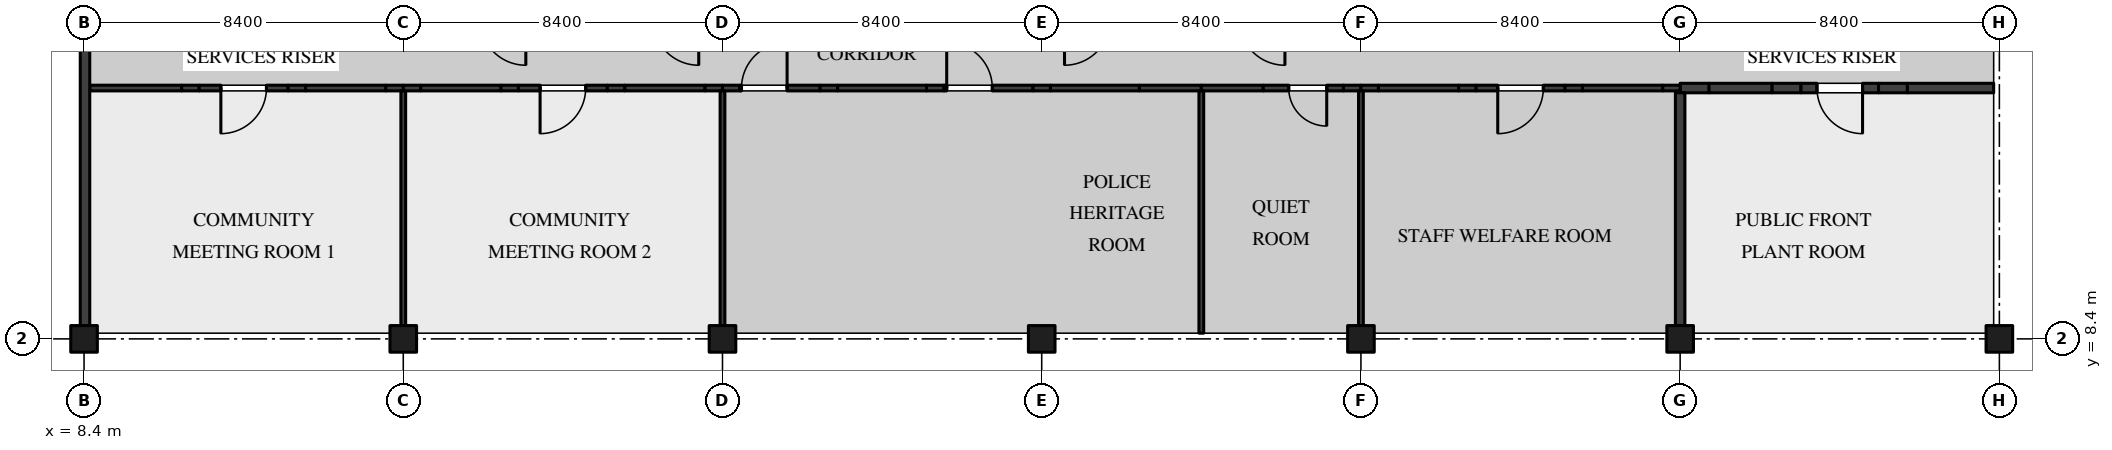
"""IFC4 building model, lengths in metres.
Left out: names, types, materials, properties, quantities, classifications, styles, units other than length and angle.
Written with IfcOpenShell. Run it as: python <this file> out.ifc"""

import sys

from ifc_helpers import new_model, si_unit, direction, frame, frame_2d, origin, origin_2d, place, context, subcontext, project, spatial, rectangle, extrude, element, fill, save


model = new_model("IFC4")
c1 = context("Model", 3, precision=1e-05, world=origin(), true_north=direction((0.0, 1.0)))
c2 = subcontext(c1, "Body", "Model", "MODEL_VIEW")
j1 = project(units=[si_unit("LENGTHUNIT", "METRE"), si_unit("PLANEANGLEUNIT", "RADIAN")], contexts=[c1])
p1 = place(None, origin())
s1 = spatial("IfcSite", under=j1, at=p1, CompositionType="ELEMENT")
p2 = place(p1, origin())
s2 = spatial("IfcBuilding", under=s1, at=p2, CompositionType="ELEMENT")
p3 = place(p2, frame((0.0, 0.0, 5.4)))
s3 = spatial("IfcBuildingStorey", under=s2, at=p3, CompositionType="ELEMENT", Elevation=5.4)
for number, where, z_axis, x_axis in (
    (1, (8.4, 8.4, 0.0), (0.0, 0.0, 1.0), (1.0, 0.0, 0.0)),
    (2, (16.8, 8.4, 0.0), (0.0, 0.0, 1.0), (1.0, 0.0, 0.0)),
    (3, (25.2, 8.4, 0.0), (0.0, 0.0, 1.0), (1.0, 0.0, 0.0)),
    (4, (33.6, 8.4, 0.0), (0.0, 0.0, 1.0), (1.0, 0.0, 0.0)),
    (5, (42.0, 8.4, 0.0), (0.0, 0.0, 1.0), (1.0, 0.0, 0.0)),
    (6, (50.4, 8.4, 0.0), (0.0, 0.0, 1.0), (1.0, 0.0, 0.0)),
    (7, (58.8, 8.4, 0.0), (0.0, 0.0, 1.0), (1.0, 0.0, 0.0)),
):
    element("IfcColumn", number, at=place(p3, frame(where, z_axis=z_axis, x_axis=x_axis)), inside=s3, PredefinedType="COLUMN", context=c2, shape_type="SweptSolid", body=[
        extrude(rectangle(XDim=0.7, YDim=0.7, at=origin_2d()), origin(), (0.0, 0.0, 1.0), 4.37),
    ])
p4 = place(p3, frame((8.55, 15.0, 0.0), z_axis=(0.0, 0.0, 1.0), x_axis=(1.0, 0.0, 0.0)))
e8 = element("IfcWall", 8, at=p4, inside=s3, PredefinedType="PARTITIONING", context=c2, shape_type="SweptSolid", body=[
    extrude(rectangle(XDim=2.42, YDim=0.15, at=frame_2d((1.21, 0.0))), origin(), (0.0, 0.0, 1.0), 4.37),
])
p5 = place(p3, frame((10.97, 15.0, 0.0), z_axis=(0.0, 0.0, 1.0), x_axis=(1.0, 0.0, 0.0)))
e9 = element("IfcWall", 9, at=p5, inside=s3, PredefinedType="PARTITIONING", context=c2, shape_type="SweptSolid", body=[
    extrude(rectangle(XDim=0.46, YDim=0.15, at=frame_2d((0.23, 0.0))), origin(), (0.0, 0.0, 1.0), 3.895),
])
p6 = place(p3, frame((11.43, 15.0, 0.0), z_axis=(0.0, 0.0, 1.0), x_axis=(1.0, 0.0, 0.0)))
e10 = element("IfcWall", 10, at=p6, inside=s3, PredefinedType="PARTITIONING", context=c2, shape_type="SweptSolid", body=[
    extrude(rectangle(XDim=2.34, YDim=0.15, at=frame_2d((1.17, 0.0))), origin(), (0.0, 0.0, 1.0), 4.37),
])
p7 = place(p6, frame((0.57, 0.0, 0.0)))
e11 = element("IfcOpeningElement", 11, at=p7, cuts=e10, PredefinedType="OPENING", context=c2, shape_type="SweptSolid", body=[
    extrude(rectangle(XDim=1.2, YDim=2.4, at=frame_2d((0.6, 1.2))), frame((0.0, 0.085, 0.0), z_axis=(0.0, -1.0, 0.0), x_axis=(1.0, 0.0, 0.0)), (0.0, 0.0, 1.0), 0.17),
])
p8 = place(p3, frame((13.77, 15.0, 0.0), z_axis=(0.0, 0.0, 1.0), x_axis=(1.0, 0.0, 0.0)))
e12 = element("IfcWall", 12, at=p8, inside=s3, PredefinedType="PARTITIONING", context=c2, shape_type="SweptSolid", body=[
    extrude(rectangle(XDim=0.46, YDim=0.15, at=frame_2d((0.23, 0.0))), origin(), (0.0, 0.0, 1.0), 3.895),
])
p9 = place(p3, frame((14.23, 15.0, 0.0), z_axis=(0.0, 0.0, 1.0), x_axis=(1.0, 0.0, 0.0)))
e13 = element("IfcWall", 13, at=p9, inside=s3, PredefinedType="PARTITIONING", context=c2, shape_type="SweptSolid", body=[
    extrude(rectangle(XDim=2.11, YDim=0.15, at=frame_2d((1.055, 0.0))), origin(), (0.0, 0.0, 1.0), 4.37),
])
p10 = place(p3, frame((16.34, 15.0, 0.0), z_axis=(0.0, 0.0, 1.0), x_axis=(1.0, 0.0, 0.0)))
e14 = element("IfcWall", 14, at=p10, inside=s3, PredefinedType="PARTITIONING", context=c2, shape_type="SweptSolid", body=[
    extrude(rectangle(XDim=0.46, YDim=0.15, at=frame_2d((0.23, 0.0))), origin(), (0.0, 0.0, 1.0), 3.746),
])
p11 = place(p3, frame((50.4, 15.0, 0.0), z_axis=(0.0, 0.0, 1.0), x_axis=(1.0, 0.0, 0.0)))
e15 = element("IfcWall", 15, at=p11, inside=s3, PredefinedType="PARTITIONING", context=c2, shape_type="SweptSolid", body=[
    extrude(rectangle(XDim=0.76, YDim=0.25, at=frame_2d((0.38, 0.0))), origin(), (0.0, 0.0, 1.0), 3.746),
])
p12 = place(p3, frame((51.16, 15.0, 0.0), z_axis=(0.0, 0.0, 1.0), x_axis=(1.0, 0.0, 0.0)))
e16 = element("IfcWall", 16, at=p12, inside=s3, PredefinedType="PARTITIONING", context=c2, shape_type="SweptSolid", body=[
    extrude(rectangle(XDim=1.66, YDim=0.25, at=frame_2d((0.83, 0.0))), origin(), (0.0, 0.0, 1.0), 4.37),
])
p13 = place(p3, frame((52.82, 15.0, 0.0), z_axis=(0.0, 0.0, 1.0), x_axis=(1.0, 0.0, 0.0)))
e17 = element("IfcWall", 17, at=p13, inside=s3, PredefinedType="PARTITIONING", context=c2, shape_type="SweptSolid", body=[
    extrude(rectangle(XDim=0.76, YDim=0.25, at=frame_2d((0.38, 0.0))), origin(), (0.0, 0.0, 1.0), 3.895),
])
p14 = place(p3, frame((53.58, 15.0, 0.0), z_axis=(0.0, 0.0, 1.0), x_axis=(1.0, 0.0, 0.0)))
e18 = element("IfcWall", 18, at=p14, inside=s3, PredefinedType="PARTITIONING", context=c2, shape_type="SweptSolid", body=[
    extrude(rectangle(XDim=2.04, YDim=0.25, at=frame_2d((1.02, 0.0))), origin(), (0.0, 0.0, 1.0), 4.37),
])
p15 = place(p14, frame((0.42, 0.0, 0.0)))
e19 = element("IfcOpeningElement", 19, at=p15, cuts=e18, PredefinedType="OPENING", context=c2, shape_type="SweptSolid", body=[
    extrude(rectangle(XDim=1.2, YDim=2.4, at=frame_2d((0.6, 1.2))), frame((0.0, 0.135, 0.0), z_axis=(0.0, -1.0, 0.0), x_axis=(1.0, 0.0, 0.0)), (0.0, 0.0, 1.0), 0.27),
])
p16 = place(p3, frame((55.62, 15.0, 0.0), z_axis=(0.0, 0.0, 1.0), x_axis=(1.0, 0.0, 0.0)))
e20 = element("IfcWall", 20, at=p16, inside=s3, PredefinedType="PARTITIONING", context=c2, shape_type="SweptSolid", body=[
    extrude(rectangle(XDim=0.76, YDim=0.25, at=frame_2d((0.38, 0.0))), origin(), (0.0, 0.0, 1.0), 3.895),
])
p17 = place(p3, frame((56.38, 15.0, 0.0), z_axis=(0.0, 0.0, 1.0), x_axis=(1.0, 0.0, 0.0)))
e21 = element("IfcWall", 21, at=p17, inside=s3, PredefinedType="PARTITIONING", context=c2, shape_type="SweptSolid", body=[
    extrude(rectangle(XDim=2.27, YDim=0.25, at=frame_2d((1.135, 0.0))), origin(), (0.0, 0.0, 1.0), 4.37),
])
p18 = place(p3, frame((16.8, 15.0, 0.0), z_axis=(0.0, 0.0, 1.0), x_axis=(1.0, 0.0, 0.0)))
e22 = element("IfcWall", 22, at=p18, inside=s3, PredefinedType="PARTITIONING", context=c2, shape_type="SweptSolid", body=[
    extrude(rectangle(XDim=0.46, YDim=0.15, at=frame_2d((0.23, 0.0))), origin(), (0.0, 0.0, 1.0), 3.746),
])
p19 = place(p3, frame((17.26, 15.0, 0.0), z_axis=(0.0, 0.0, 1.0), x_axis=(1.0, 0.0, 0.0)))
e23 = element("IfcWall", 23, at=p19, inside=s3, PredefinedType="PARTITIONING", context=c2, shape_type="SweptSolid", body=[
    extrude(rectangle(XDim=2.11, YDim=0.15, at=frame_2d((1.055, 0.0))), origin(), (0.0, 0.0, 1.0), 4.37),
])
p20 = place(p3, frame((19.37, 15.0, 0.0), z_axis=(0.0, 0.0, 1.0), x_axis=(1.0, 0.0, 0.0)))
e24 = element("IfcWall", 24, at=p20, inside=s3, PredefinedType="PARTITIONING", context=c2, shape_type="SweptSolid", body=[
    extrude(rectangle(XDim=0.46, YDim=0.15, at=frame_2d((0.23, 0.0))), origin(), (0.0, 0.0, 1.0), 3.895),
])
p21 = place(p3, frame((19.83, 15.0, 0.0), z_axis=(0.0, 0.0, 1.0), x_axis=(1.0, 0.0, 0.0)))
e25 = element("IfcWall", 25, at=p21, inside=s3, PredefinedType="PARTITIONING", context=c2, shape_type="SweptSolid", body=[
    extrude(rectangle(XDim=2.34, YDim=0.15, at=frame_2d((1.17, 0.0))), origin(), (0.0, 0.0, 1.0), 4.37),
])
p22 = place(p21, frame((0.57, 0.0, 0.0)))
e26 = element("IfcOpeningElement", 26, at=p22, cuts=e25, PredefinedType="OPENING", context=c2, shape_type="SweptSolid", body=[
    extrude(rectangle(XDim=1.2, YDim=2.4, at=frame_2d((0.6, 1.2))), frame((0.0, 0.085, 0.0), z_axis=(0.0, -1.0, 0.0), x_axis=(1.0, 0.0, 0.0)), (0.0, 0.0, 1.0), 0.17),
])
p23 = place(p3, frame((22.17, 15.0, 0.0), z_axis=(0.0, 0.0, 1.0), x_axis=(1.0, 0.0, 0.0)))
e27 = element("IfcWall", 27, at=p23, inside=s3, PredefinedType="PARTITIONING", context=c2, shape_type="SweptSolid", body=[
    extrude(rectangle(XDim=0.46, YDim=0.15, at=frame_2d((0.23, 0.0))), origin(), (0.0, 0.0, 1.0), 3.895),
])
p24 = place(p3, frame((22.63, 15.0, 0.0), z_axis=(0.0, 0.0, 1.0), x_axis=(1.0, 0.0, 0.0)))
e28 = element("IfcWall", 28, at=p24, inside=s3, PredefinedType="PARTITIONING", context=c2, shape_type="SweptSolid", body=[
    extrude(rectangle(XDim=2.11, YDim=0.15, at=frame_2d((1.055, 0.0))), origin(), (0.0, 0.0, 1.0), 4.37),
])
for number, where, z_axis, x_axis in (
    (29, (24.74, 15.0, 0.0), (0.0, 0.0, 1.0), (1.0, 0.0, 0.0)),
    (30, (25.2, 15.0, 0.0), (0.0, 0.0, 1.0), (1.0, 0.0, 0.0)),
):
    element("IfcWall", number, at=place(p3, frame(where, z_axis=z_axis, x_axis=x_axis)), inside=s3, PredefinedType="PARTITIONING", context=c2, shape_type="SweptSolid", body=[
        extrude(rectangle(XDim=0.46, YDim=0.15, at=frame_2d((0.23, 0.0))), origin(), (0.0, 0.0, 1.0), 3.746),
    ])
p25 = place(p3, frame((25.66, 15.0, 0.0), z_axis=(0.0, 0.0, 1.0), x_axis=(1.0, 0.0, 0.0)))
e31 = element("IfcWall", 31, at=p25, inside=s3, PredefinedType="PARTITIONING", context=c2, shape_type="SweptSolid", body=[
    extrude(rectangle(XDim=2.11, YDim=0.15, at=frame_2d((1.055, 0.0))), origin(), (0.0, 0.0, 1.0), 4.37),
])
p26 = place(p25, frame((0.04, 0.0, 0.0)))
e32 = element("IfcOpeningElement", 32, at=p26, cuts=e31, PredefinedType="OPENING", context=c2, shape_type="SweptSolid", body=[
    extrude(rectangle(XDim=1.2, YDim=2.4, at=frame_2d((0.6, 1.2))), frame((0.0, 0.085, 0.0), z_axis=(0.0, -1.0, 0.0), x_axis=(1.0, 0.0, 0.0)), (0.0, 0.0, 1.0), 0.17),
])
p27 = place(p3, frame((27.77, 15.0, 0.0), z_axis=(0.0, 0.0, 1.0), x_axis=(1.0, 0.0, 0.0)))
e33 = element("IfcWall", 33, at=p27, inside=s3, PredefinedType="PARTITIONING", context=c2, shape_type="SweptSolid", body=[
    extrude(rectangle(XDim=0.46, YDim=0.15, at=frame_2d((0.23, 0.0))), origin(), (0.0, 0.0, 1.0), 3.895),
])
p28 = place(p3, frame((28.23, 15.0, 0.0), z_axis=(0.0, 0.0, 1.0), x_axis=(1.0, 0.0, 0.0)))
e34 = element("IfcWall", 34, at=p28, inside=s3, PredefinedType="PARTITIONING", context=c2, shape_type="SweptSolid", body=[
    extrude(rectangle(XDim=2.34, YDim=0.15, at=frame_2d((1.17, 0.0))), origin(), (0.0, 0.0, 1.0), 4.37),
])
p29 = place(p3, frame((30.57, 15.0, 0.0), z_axis=(0.0, 0.0, 1.0), x_axis=(1.0, 0.0, 0.0)))
e35 = element("IfcWall", 35, at=p29, inside=s3, PredefinedType="PARTITIONING", context=c2, shape_type="SweptSolid", body=[
    extrude(rectangle(XDim=0.46, YDim=0.15, at=frame_2d((0.23, 0.0))), origin(), (0.0, 0.0, 1.0), 3.895),
])
p30 = place(p3, frame((31.03, 15.0, 0.0), z_axis=(0.0, 0.0, 1.0), x_axis=(1.0, 0.0, 0.0)))
e36 = element("IfcWall", 36, at=p30, inside=s3, PredefinedType="PARTITIONING", context=c2, shape_type="SweptSolid", body=[
    extrude(rectangle(XDim=2.34, YDim=0.15, at=frame_2d((1.17, 0.0))), origin(), (0.0, 0.0, 1.0), 4.37),
])
p31 = place(p30, frame((0.07, 0.0, 0.0)))
e37 = element("IfcOpeningElement", 37, at=p31, cuts=e36, PredefinedType="OPENING", context=c2, shape_type="SweptSolid", body=[
    extrude(rectangle(XDim=1.2, YDim=2.4, at=frame_2d((0.6, 1.2))), frame((0.0, 0.085, 0.0), z_axis=(0.0, -1.0, 0.0), x_axis=(1.0, 0.0, 0.0)), (0.0, 0.0, 1.0), 0.17),
])
p32 = place(p3, frame((33.37, 15.0, 0.0), z_axis=(0.0, 0.0, 1.0), x_axis=(1.0, 0.0, 0.0)))
e38 = element("IfcWall", 38, at=p32, inside=s3, PredefinedType="PARTITIONING", context=c2, shape_type="SweptSolid", body=[
    extrude(rectangle(XDim=0.46, YDim=0.15, at=frame_2d((0.23, 0.0))), origin(), (0.0, 0.0, 1.0), 3.746),
])
p33 = place(p3, frame((33.83, 15.0, 0.0), z_axis=(0.0, 0.0, 1.0), x_axis=(1.0, 0.0, 0.0)))
e39 = element("IfcWall", 39, at=p33, inside=s3, PredefinedType="PARTITIONING", context=c2, shape_type="SweptSolid", body=[
    extrude(rectangle(XDim=2.34, YDim=0.15, at=frame_2d((1.17, 0.0))), origin(), (0.0, 0.0, 1.0), 4.37),
])
p34 = place(p3, frame((36.17, 15.0, 0.0), z_axis=(0.0, 0.0, 1.0), x_axis=(1.0, 0.0, 0.0)))
e40 = element("IfcWall", 40, at=p34, inside=s3, PredefinedType="PARTITIONING", context=c2, shape_type="SweptSolid", body=[
    extrude(rectangle(XDim=1.63, YDim=0.15, at=frame_2d((0.815, 0.0))), origin(), (0.0, 0.0, 1.0), 3.895),
])
p35 = place(p3, frame((37.8, 15.0, 0.0), z_axis=(0.0, 0.0, 1.0), x_axis=(1.0, 0.0, 0.0)))
e41 = element("IfcWall", 41, at=p35, inside=s3, PredefinedType="PARTITIONING", context=c2, shape_type="SweptSolid", body=[
    extrude(rectangle(XDim=1.63, YDim=0.15, at=frame_2d((0.815, 0.0))), origin(), (0.0, 0.0, 1.0), 3.895),
])
p36 = place(p3, frame((39.43, 15.0, 0.0), z_axis=(0.0, 0.0, 1.0), x_axis=(1.0, 0.0, 0.0)))
e42 = element("IfcWall", 42, at=p36, inside=s3, PredefinedType="PARTITIONING", context=c2, shape_type="SweptSolid", body=[
    extrude(rectangle(XDim=2.11, YDim=0.15, at=frame_2d((1.055, 0.0))), origin(), (0.0, 0.0, 1.0), 4.37),
])
p37 = place(p36, frame((0.67, 0.0, 0.0)))
e43 = element("IfcOpeningElement", 43, at=p37, cuts=e42, PredefinedType="OPENING", context=c2, shape_type="SweptSolid", body=[
    extrude(rectangle(XDim=1.0, YDim=2.1, at=frame_2d((0.5, 1.05))), frame((0.0, 0.085, 0.0), z_axis=(0.0, -1.0, 0.0), x_axis=(1.0, 0.0, 0.0)), (0.0, 0.0, 1.0), 0.17),
])
for number, where, z_axis, x_axis in (
    (44, (41.54, 15.0, 0.0), (0.0, 0.0, 1.0), (1.0, 0.0, 0.0)),
    (45, (42.0, 15.0, 0.0), (0.0, 0.0, 1.0), (1.0, 0.0, 0.0)),
):
    element("IfcWall", number, at=place(p3, frame(where, z_axis=z_axis, x_axis=x_axis)), inside=s3, PredefinedType="PARTITIONING", context=c2, shape_type="SweptSolid", body=[
        extrude(rectangle(XDim=0.46, YDim=0.15, at=frame_2d((0.23, 0.0))), origin(), (0.0, 0.0, 1.0), 3.746),
    ])
p38 = place(p3, frame((42.46, 15.0, 0.0), z_axis=(0.0, 0.0, 1.0), x_axis=(1.0, 0.0, 0.0)))
e46 = element("IfcWall", 46, at=p38, inside=s3, PredefinedType="PARTITIONING", context=c2, shape_type="SweptSolid", body=[
    extrude(rectangle(XDim=2.11, YDim=0.15, at=frame_2d((1.055, 0.0))), origin(), (0.0, 0.0, 1.0), 4.37),
])
p39 = place(p3, frame((44.57, 15.0, 0.0), z_axis=(0.0, 0.0, 1.0), x_axis=(1.0, 0.0, 0.0)))
e47 = element("IfcWall", 47, at=p39, inside=s3, PredefinedType="PARTITIONING", context=c2, shape_type="SweptSolid", body=[
    extrude(rectangle(XDim=0.46, YDim=0.15, at=frame_2d((0.23, 0.0))), origin(), (0.0, 0.0, 1.0), 3.895),
])
p40 = place(p3, frame((45.03, 15.0, 0.0), z_axis=(0.0, 0.0, 1.0), x_axis=(1.0, 0.0, 0.0)))
e48 = element("IfcWall", 48, at=p40, inside=s3, PredefinedType="PARTITIONING", context=c2, shape_type="SweptSolid", body=[
    extrude(rectangle(XDim=2.34, YDim=0.15, at=frame_2d((1.17, 0.0))), origin(), (0.0, 0.0, 1.0), 4.37),
])
p41 = place(p40, frame((0.57, 0.0, 0.0)))
e49 = element("IfcOpeningElement", 49, at=p41, cuts=e48, PredefinedType="OPENING", context=c2, shape_type="SweptSolid", body=[
    extrude(rectangle(XDim=1.2, YDim=2.4, at=frame_2d((0.6, 1.2))), frame((0.0, 0.085, 0.0), z_axis=(0.0, -1.0, 0.0), x_axis=(1.0, 0.0, 0.0)), (0.0, 0.0, 1.0), 0.17),
])
p42 = place(p3, frame((47.37, 15.0, 0.0), z_axis=(0.0, 0.0, 1.0), x_axis=(1.0, 0.0, 0.0)))
e50 = element("IfcWall", 50, at=p42, inside=s3, PredefinedType="PARTITIONING", context=c2, shape_type="SweptSolid", body=[
    extrude(rectangle(XDim=0.46, YDim=0.15, at=frame_2d((0.23, 0.0))), origin(), (0.0, 0.0, 1.0), 3.895),
])
p43 = place(p3, frame((47.83, 15.0, 0.0), z_axis=(0.0, 0.0, 1.0), x_axis=(1.0, 0.0, 0.0)))
e51 = element("IfcWall", 51, at=p43, inside=s3, PredefinedType="PARTITIONING", context=c2, shape_type="SweptSolid", body=[
    extrude(rectangle(XDim=2.11, YDim=0.15, at=frame_2d((1.055, 0.0))), origin(), (0.0, 0.0, 1.0), 4.37),
])
p44 = place(p3, frame((49.94, 15.0, 0.0), z_axis=(0.0, 0.0, 1.0), x_axis=(1.0, 0.0, 0.0)))
e52 = element("IfcWall", 52, at=p44, inside=s3, PredefinedType="PARTITIONING", context=c2, shape_type="SweptSolid", body=[
    extrude(rectangle(XDim=0.46, YDim=0.15, at=frame_2d((0.23, 0.0))), origin(), (0.0, 0.0, 1.0), 3.746),
])
p45 = place(p3, frame((16.8, 8.75, 0.0), z_axis=(0.0, 0.0, 1.0), x_axis=(0.0, 1.0, 0.0)))
e53 = element("IfcWall", 53, at=p45, inside=s3, PredefinedType="PARTITIONING", context=c2, shape_type="SweptSolid", body=[
    extrude(rectangle(XDim=6.175, YDim=0.125, at=frame_2d((3.087, 0.0))), origin(), (0.0, 0.0, 1.0), 3.746),
])
p46 = place(p3, frame((50.4, 8.75, 0.0), z_axis=(0.0, 0.0, 1.0), x_axis=(0.0, 1.0, 0.0)))
e54 = element("IfcWall", 54, at=p46, inside=s3, PredefinedType="PARTITIONING", context=c2, shape_type="SweptSolid", body=[
    extrude(rectangle(XDim=6.125, YDim=0.25, at=frame_2d((3.062, 0.0))), origin(), (0.0, 0.0, 1.0), 3.746),
])
p47 = place(p3, frame((25.2, 8.75, 0.0), z_axis=(0.0, 0.0, 1.0), x_axis=(0.0, 1.0, 0.0)))
e55 = element("IfcWall", 55, at=p47, inside=s3, PredefinedType="PARTITIONING", context=c2, shape_type="SweptSolid", body=[
    extrude(rectangle(XDim=6.175, YDim=0.125, at=frame_2d((3.087, 0.0))), origin(), (0.0, 0.0, 1.0), 3.746),
])
p48 = place(p3, frame((37.8, 8.55, 0.0), z_axis=(0.0, 0.0, 1.0), x_axis=(0.0, 1.0, 0.0)))
e56 = element("IfcWall", 56, at=p48, inside=s3, PredefinedType="PARTITIONING", context=c2, shape_type="SweptSolid", body=[
    extrude(rectangle(XDim=6.375, YDim=0.125, at=frame_2d((3.188, 0.0))), origin(), (0.0, 0.0, 1.0), 4.37),
])
p49 = place(p3, frame((42.0, 8.75, 0.0), z_axis=(0.0, 0.0, 1.0), x_axis=(0.0, 1.0, 0.0)))
e57 = element("IfcWall", 57, at=p49, inside=s3, PredefinedType="PARTITIONING", context=c2, shape_type="SweptSolid", body=[
    extrude(rectangle(XDim=6.175, YDim=0.125, at=frame_2d((3.087, 0.0))), origin(), (0.0, 0.0, 1.0), 3.746),
])
p50 = place(p3, frame((8.425, 16.6, 0.0), z_axis=(0.0, 0.0, 1.0), x_axis=(0.0, -1.0, 0.0)))
e58 = element("IfcWall", 58, at=p50, inside=s3, PredefinedType="SOLIDWALL", context=c2, shape_type="SweptSolid", body=[
    extrude(rectangle(XDim=7.87, YDim=0.25, at=frame_2d((3.935, 0.0))), origin(), (0.0, 0.0, 1.0), 3.746),
])
p51 = place(p7, frame((1.2, 0.0, 0.0), z_axis=(0.0, 0.0, 1.0), x_axis=(-1.0, 0.0, 0.0)))
e59 = element("IfcDoor", 59, at=p51, inside=s3, OperationType="SINGLE_SWING_LEFT", PredefinedType="DOOR", context=c2, shape_type="SweptSolid", body=[
    extrude(rectangle(XDim=1.2, YDim=2.4, at=frame_2d((0.6, 1.2))), frame((0.0, 0.025, 0.0), z_axis=(0.0, -1.0, 0.0), x_axis=(1.0, 0.0, 0.0)), (0.0, 0.0, 1.0), 0.05),
])
fill(e11, e59)
p52 = place(p15, frame((1.2, 0.0, 0.0), z_axis=(0.0, 0.0, 1.0), x_axis=(-1.0, 0.0, 0.0)))
e60 = element("IfcDoor", 60, at=p52, inside=s3, OperationType="SINGLE_SWING_RIGHT", PredefinedType="DOOR", context=c2, shape_type="SweptSolid", body=[
    extrude(rectangle(XDim=1.2, YDim=2.4, at=frame_2d((0.6, 1.2))), frame((0.0, 0.05, 0.0), z_axis=(0.0, -1.0, 0.0), x_axis=(1.0, 0.0, 0.0)), (0.0, 0.0, 1.0), 0.1),
])
fill(e19, e60)
p53 = place(p22, frame((1.2, 0.0, 0.0), z_axis=(0.0, 0.0, 1.0), x_axis=(-1.0, 0.0, 0.0)))
e61 = element("IfcDoor", 61, at=p53, inside=s3, OperationType="SINGLE_SWING_LEFT", PredefinedType="DOOR", context=c2, shape_type="SweptSolid", body=[
    extrude(rectangle(XDim=1.2, YDim=2.4, at=frame_2d((0.6, 1.2))), frame((0.0, 0.025, 0.0), z_axis=(0.0, -1.0, 0.0), x_axis=(1.0, 0.0, 0.0)), (0.0, 0.0, 1.0), 0.05),
])
fill(e26, e61)
p54 = place(p26, origin())
e62 = element("IfcDoor", 62, at=p54, inside=s3, OperationType="SINGLE_SWING_LEFT", PredefinedType="DOOR", context=c2, shape_type="SweptSolid", body=[
    extrude(rectangle(XDim=1.2, YDim=2.4, at=frame_2d((0.6, 1.2))), frame((0.0, 0.025, 0.0), z_axis=(0.0, -1.0, 0.0), x_axis=(1.0, 0.0, 0.0)), (0.0, 0.0, 1.0), 0.05),
])
fill(e32, e62)
p55 = place(p31, origin())
e63 = element("IfcDoor", 63, at=p55, inside=s3, OperationType="SINGLE_SWING_RIGHT", PredefinedType="DOOR", context=c2, shape_type="SweptSolid", body=[
    extrude(rectangle(XDim=1.2, YDim=2.4, at=frame_2d((0.6, 1.2))), frame((0.0, 0.025, 0.0), z_axis=(0.0, -1.0, 0.0), x_axis=(1.0, 0.0, 0.0)), (0.0, 0.0, 1.0), 0.05),
])
fill(e37, e63)
p56 = place(p37, frame((1.0, 0.0, 0.0), z_axis=(0.0, 0.0, 1.0), x_axis=(-1.0, 0.0, 0.0)))
e64 = element("IfcDoor", 64, at=p56, inside=s3, OperationType="SINGLE_SWING_RIGHT", PredefinedType="DOOR", context=c2, shape_type="SweptSolid", body=[
    extrude(rectangle(XDim=1.0, YDim=2.1, at=frame_2d((0.5, 1.05))), frame((0.0, 0.025, 0.0), z_axis=(0.0, -1.0, 0.0), x_axis=(1.0, 0.0, 0.0)), (0.0, 0.0, 1.0), 0.05),
])
fill(e43, e64)
p57 = place(p41, frame((1.2, 0.0, 0.0), z_axis=(0.0, 0.0, 1.0), x_axis=(-1.0, 0.0, 0.0)))
e65 = element("IfcDoor", 65, at=p57, inside=s3, OperationType="SINGLE_SWING_LEFT", PredefinedType="DOOR", context=c2, shape_type="SweptSolid", body=[
    extrude(rectangle(XDim=1.2, YDim=2.4, at=frame_2d((0.6, 1.2))), frame((0.0, 0.025, 0.0), z_axis=(0.0, -1.0, 0.0), x_axis=(1.0, 0.0, 0.0)), (0.0, 0.0, 1.0), 0.05),
])
fill(e49, e65)
save(model, sys.argv[1])
